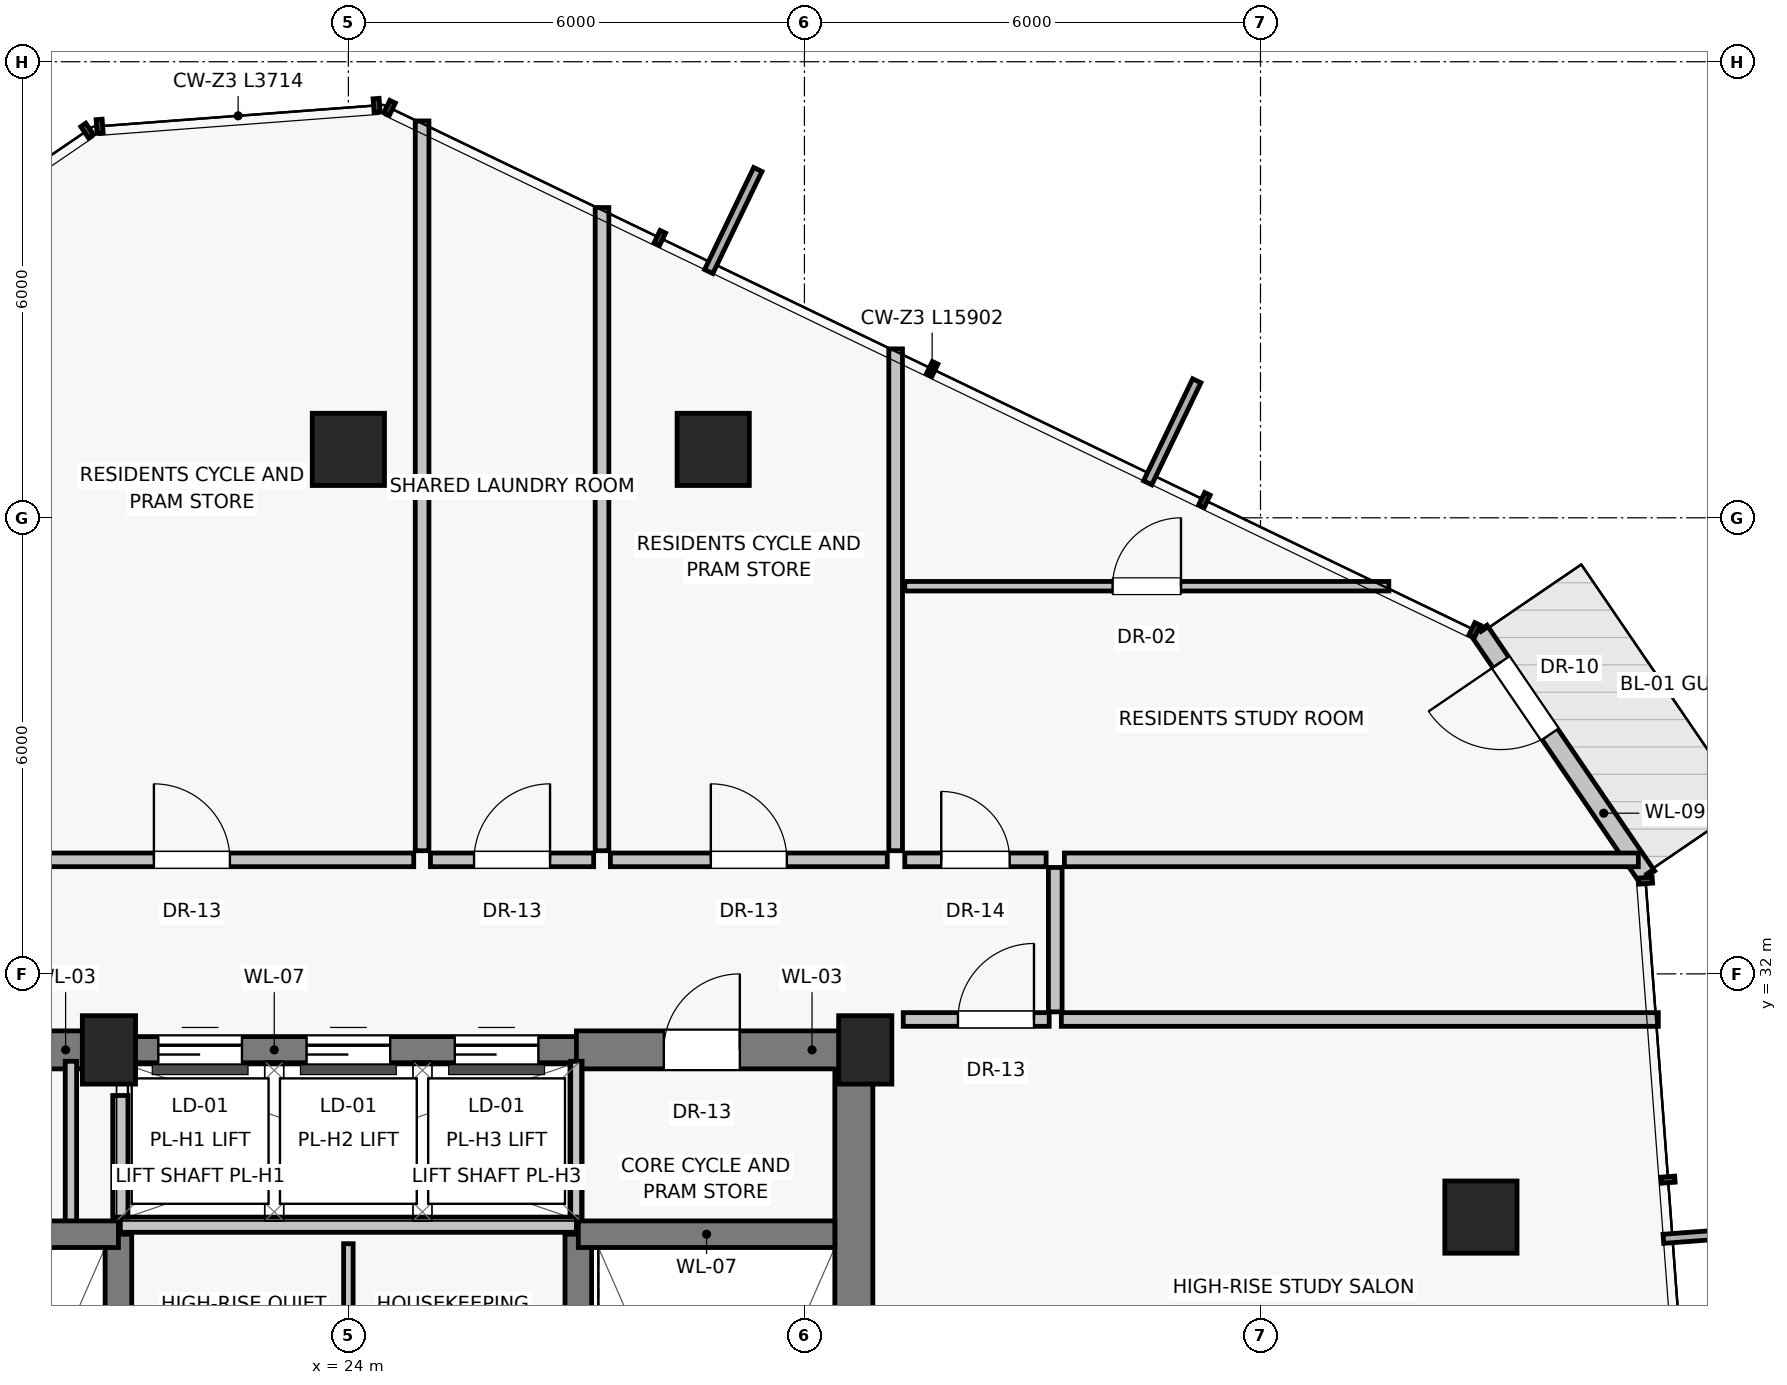
"""IFC4 building model, lengths in metres.
Left out: names, types, materials, properties, quantities, classifications, styles, units other than length and angle.
Written with IfcOpenShell. Run it as: python <this file> out.ifc"""

import sys

from ifc_helpers import new_model, si_unit, direction, frame, frame_2d, origin, origin_2d, place, context, subcontext, project, spatial, rectangle, extrude, source, transform, mapped, element, fill, save


model = new_model("IFC4")
c1 = context("Model", 3, precision=1e-05, world=origin(), true_north=direction((0.0, 1.0)))
c2 = subcontext(c1, "Body", "Model", "MODEL_VIEW")
j1 = project(units=[si_unit("LENGTHUNIT", "METRE"), si_unit("PLANEANGLEUNIT", "RADIAN")], contexts=[c1])
p1 = place(None, origin())
s1 = spatial("IfcSite", under=j1, at=p1, CompositionType="ELEMENT")
p2 = place(p1, origin())
s2 = spatial("IfcBuilding", under=s1, at=p2, CompositionType="ELEMENT")
p3 = place(p2, frame((0.0, 0.0, 191.85)))
s3 = spatial("IfcBuildingStorey", under=s2, at=p3, CompositionType="ELEMENT", Elevation=191.85)
for number, where, z_axis, x_axis in (
    (1, (20.85, 31.0, 0.0), (0.0, 0.0, 1.0), (1.0, 0.0, 0.0)),
    (2, (30.8, 31.0, 0.0), (0.0, 0.0, 1.0), (1.0, 0.0, 0.0)),
):
    element("IfcColumn", number, at=place(p3, frame(where, z_axis=z_axis, x_axis=x_axis)), inside=s3, PredefinedType="PILASTER", context=c2, shape_type="SweptSolid", body=[
        extrude(rectangle(XDim=0.7, YDim=0.9, at=origin_2d()), origin(), (0.0, 0.0, 1.0), 3.25),
    ])
for number, where, z_axis, x_axis in (
    (3, (38.9, 28.8, 0.0), (0.0, 0.0, 1.0), (1.0, 0.0, 0.0)),
    (4, (28.8, 38.9, 0.0), (0.0, 0.0, 1.0), (1.0, 0.0, 0.0)),
    (5, (24.0, 38.9, 0.0), (0.0, 0.0, 1.0), (1.0, 0.0, 0.0)),
):
    element("IfcColumn", number, at=place(p3, frame(where, z_axis=z_axis, x_axis=x_axis)), inside=s3, PredefinedType="COLUMN", context=c2, shape_type="SweptSolid", body=[
        extrude(rectangle(XDim=0.95, YDim=0.95, at=origin_2d()), origin(), (0.0, 0.0, 1.0), 3.25),
    ])
p4 = place(p3, frame((41.082, 33.284, 0.0), z_axis=(0.0, 0.0, 1.0), x_axis=(-0.563549704733, 0.82608215711, 0.0)))
e6 = element("IfcWall", 6, at=p4, inside=s3, PredefinedType="SOLIDWALL", context=c2, shape_type="SweptSolid", body=[
    extrude(rectangle(XDim=3.914, YDim=0.25, at=frame_2d((1.957, 0.0))), origin(), (0.0, 0.0, 1.0), 3.015),
])
p5 = place(p4, frame((2.26, 0.0, 0.0)))
e7 = element("IfcOpeningElement", 7, at=p5, cuts=e6, PredefinedType="OPENING", context=c2, shape_type="SweptSolid", body=[
    extrude(rectangle(XDim=1.15, YDim=2.25, at=frame_2d((0.575, 1.125))), frame((0.0, 0.135, 0.0), z_axis=(0.0, -1.0, 0.0), x_axis=(1.0, 0.0, 0.0)), (0.0, 0.0, 1.0), 0.27),
])
p6 = place(p3, frame((30.65, 16.8, 0.0), z_axis=(0.0, 0.0, 1.0), x_axis=(0.0, 1.0, 0.0)))
e8 = element("IfcWall", 8, at=p6, inside=s3, PredefinedType="SHEAR", context=c2, shape_type="SweptSolid", body=[
    extrude(rectangle(XDim=14.2, YDim=0.5, at=frame_2d((7.1, 0.0))), origin(), (0.0, 0.0, 1.0), 3.015),
])
p7 = place(p3, frame((17.2, 31.0, 0.0), z_axis=(0.0, 0.0, 1.0), x_axis=(1.0, 0.0, 0.0)))
e9 = element("IfcWall", 9, at=p7, inside=s3, PredefinedType="SHEAR", context=c2, shape_type="SweptSolid", body=[
    extrude(rectangle(XDim=3.8, YDim=0.5, at=frame_2d((1.9, 0.0))), origin(), (0.0, 0.0, 1.0), 3.015),
])
p8 = place(p7, frame((1.25, 0.0, 0.0)))
e10 = element("IfcOpeningElement", 10, at=p8, cuts=e9, PredefinedType="OPENING", context=c2, shape_type="SweptSolid", body=[
    extrude(rectangle(XDim=0.86, YDim=2.01, at=frame_2d((0.43, 1.005))), frame((0.0, 0.26, 0.0), z_axis=(0.0, -1.0, 0.0), x_axis=(1.0, 0.0, 0.0)), (0.0, 0.0, 1.0), 0.52),
])
p9 = place(p3, frame((21.0, 31.0, 0.0), z_axis=(0.0, 0.0, 1.0), x_axis=(1.0, 0.0, 0.0)))
e11 = element("IfcWall", 11, at=p9, inside=s3, PredefinedType="SHEAR", context=c2, shape_type="SweptSolid", body=[
    extrude(rectangle(XDim=6.0, YDim=0.35, at=frame_2d((3.0, 0.0))), origin(), (0.0, 0.0, 1.0), 3.015),
])
p10 = place(p9, frame((0.5, 0.0, 0.0)))
e12 = element("IfcOpeningElement", 12, at=p10, cuts=e11, PredefinedType="OPENING", context=c2, shape_type="SweptSolid", body=[
    extrude(rectangle(XDim=1.1, YDim=2.08, at=frame_2d((0.55, 1.04))), frame((0.0, 0.185, 0.0), z_axis=(0.0, -1.0, 0.0), x_axis=(1.0, 0.0, 0.0)), (0.0, 0.0, 1.0), 0.37),
])
p11 = place(p9, frame((2.45, 0.0, 0.0)))
e13 = element("IfcOpeningElement", 13, at=p11, cuts=e11, PredefinedType="OPENING", context=c2, shape_type="SweptSolid", body=[
    extrude(rectangle(XDim=1.1, YDim=2.08, at=frame_2d((0.55, 1.04))), frame((0.0, 0.185, 0.0), z_axis=(0.0, -1.0, 0.0), x_axis=(1.0, 0.0, 0.0)), (0.0, 0.0, 1.0), 0.37),
])
p12 = place(p9, frame((4.4, 0.0, 0.0)))
e14 = element("IfcOpeningElement", 14, at=p12, cuts=e11, PredefinedType="OPENING", context=c2, shape_type="SweptSolid", body=[
    extrude(rectangle(XDim=1.1, YDim=2.08, at=frame_2d((0.55, 1.04))), frame((0.0, 0.185, 0.0), z_axis=(0.0, -1.0, 0.0), x_axis=(1.0, 0.0, 0.0)), (0.0, 0.0, 1.0), 0.37),
])
p13 = place(p3, frame((27.0, 31.0, 0.0), z_axis=(0.0, 0.0, 1.0), x_axis=(1.0, 0.0, 0.0)))
e15 = element("IfcWall", 15, at=p13, inside=s3, PredefinedType="SHEAR", context=c2, shape_type="SweptSolid", body=[
    extrude(rectangle(XDim=3.8, YDim=0.5, at=frame_2d((1.9, 0.0))), origin(), (0.0, 0.0, 1.0), 3.015),
])
p14 = place(p13, frame((1.15, 0.0, 0.0)))
e16 = element("IfcOpeningElement", 16, at=p14, cuts=e15, PredefinedType="OPENING", context=c2, shape_type="SweptSolid", body=[
    extrude(rectangle(XDim=1.0, YDim=2.01, at=frame_2d((0.5, 1.005))), frame((0.0, 0.26, 0.0), z_axis=(0.0, -1.0, 0.0), x_axis=(1.0, 0.0, 0.0)), (0.0, 0.0, 1.0), 0.52),
])
for number, where, z_axis, x_axis in (
    (17, (20.35, 28.65, 0.0), (0.0, 0.0, 1.0), (0.0, 1.0, 0.0)),
    (18, (27.0, 28.65, 0.0), (0.0, 0.0, 1.0), (0.0, 1.0, 0.0)),
):
    element("IfcWall", number, at=place(p3, frame(where, z_axis=z_axis, x_axis=x_axis)), inside=s3, PredefinedType="PARTITIONING", context=c2, shape_type="SweptSolid", body=[
        extrude(rectangle(XDim=2.2, YDim=0.15, at=frame_2d((1.1, 0.0))), origin(), (0.0, 0.0, 1.0), 3.015),
    ])
for number, where, z_axis, x_axis in (
    (19, (20.975, 19.8, 0.0), (0.0, 0.0, 1.0), (0.0, 1.0, 0.0)),
    (20, (27.025, 19.8, 0.0), (0.0, 0.0, 1.0), (0.0, 1.0, 0.0)),
):
    element("IfcWall", number, at=place(p3, frame(where, z_axis=z_axis, x_axis=x_axis)), inside=s3, PredefinedType="SHEAR", context=c2, shape_type="SweptSolid", body=[
        extrude(rectangle(XDim=8.775, YDim=0.35, at=frame_2d((4.387, 0.0))), origin(), (0.0, 0.0, 1.0), 3.015),
    ])
for number, where, z_axis, x_axis in (
    (21, (17.6, 28.575, 0.0), (0.0, 0.0, 1.0), (1.0, 0.0, 0.0)),
    (22, (27.025, 28.575, 0.0), (0.0, 0.0, 1.0), (1.0, 0.0, 0.0)),
):
    element("IfcWall", number, at=place(p3, frame(where, z_axis=z_axis, x_axis=x_axis)), inside=s3, PredefinedType="SHEAR", context=c2, shape_type="SweptSolid", body=[
        extrude(rectangle(XDim=3.375, YDim=0.35, at=frame_2d((1.688, 0.0))), origin(), (0.0, 0.0, 1.0), 3.015),
    ])
p15 = place(p3, frame((21.0, 28.7, 0.0), z_axis=(0.0, 0.0, 1.0), x_axis=(1.0, 0.0, 0.0)))
e23 = element("IfcWall", 23, at=p15, inside=s3, PredefinedType="SOLIDWALL", context=c2, shape_type="SweptSolid", body=[
    extrude(rectangle(XDim=6.0, YDim=0.2, at=frame_2d((3.0, 0.0))), origin(), (0.0, 0.0, 1.0), 3.015),
])
p16 = place(p3, frame((21.0, 28.8, 0.0), z_axis=(0.0, 0.0, 1.0), x_axis=(0.0, 1.0, 0.0)))
e24 = element("IfcWall", 24, at=p16, inside=s3, PredefinedType="SOLIDWALL", context=c2, shape_type="SweptSolid", body=[
    extrude(rectangle(XDim=1.6, YDim=0.2, at=frame_2d((0.8, 0.0))), origin(), (0.0, 0.0, 1.0), 3.015),
])
p17 = place(p3, frame((24.0, 25.42, 0.0), z_axis=(0.0, 0.0, 1.0), x_axis=(0.0, 1.0, 0.0)))
e25 = element("IfcWall", 25, at=p17, inside=s3, PredefinedType="PARTITIONING", context=c2, shape_type="SweptSolid", body=[
    extrude(rectangle(XDim=3.03, YDim=0.125, at=frame_2d((1.515, 0.0))), origin(), (0.0, 0.0, 1.0), 3.015),
])
p18 = place(p3, frame((31.2, 33.62, 0.0), z_axis=(0.0, 0.0, 1.0), x_axis=(0.0, 1.0, 0.0)))
e26 = element("IfcWall", 26, at=p18, inside=s3, PredefinedType="PARTITIONING", context=c2, shape_type="SweptSolid", body=[
    extrude(rectangle(XDim=6.603, YDim=0.18, at=frame_2d((3.301, 0.0))), origin(), (0.0, 0.0, 1.0), 3.015),
])
p19 = place(p3, frame((19.023, 33.5, 0.0), z_axis=(0.0, 0.0, 1.0), x_axis=(1.0, 0.0, 0.0)))
e27 = element("IfcWall", 27, at=p19, inside=s3, PredefinedType="PARTITIONING", context=c2, shape_type="SweptSolid", body=[
    extrude(rectangle(XDim=5.837, YDim=0.18, at=frame_2d((2.918, 0.0))), origin(), (0.0, 0.0, 1.0), 3.015),
])
p20 = place(p19, frame((2.418, 0.0, 0.0)))
e28 = element("IfcOpeningElement", 28, at=p20, cuts=e27, PredefinedType="OPENING", context=c2, shape_type="SweptSolid", body=[
    extrude(rectangle(XDim=1.0, YDim=2.01, at=frame_2d((0.5, 1.005))), frame((0.0, 0.1, 0.0), z_axis=(0.0, -1.0, 0.0), x_axis=(1.0, 0.0, 0.0)), (0.0, 0.0, 1.0), 0.2),
])
p21 = place(p3, frame((24.97, 33.62, 0.0), z_axis=(0.0, 0.0, 1.0), x_axis=(0.0, 1.0, 0.0)))
e29 = element("IfcWall", 29, at=p21, inside=s3, PredefinedType="PARTITIONING", context=c2, shape_type="SweptSolid", body=[
    extrude(rectangle(XDim=9.601, YDim=0.18, at=frame_2d((4.8, 0.0))), origin(), (0.0, 0.0, 1.0), 3.015),
])
p22 = place(p3, frame((25.08, 33.5, 0.0), z_axis=(0.0, 0.0, 1.0), x_axis=(1.0, 0.0, 0.0)))
e30 = element("IfcWall", 30, at=p22, inside=s3, PredefinedType="PARTITIONING", context=c2, shape_type="SweptSolid", body=[
    extrude(rectangle(XDim=2.147, YDim=0.18, at=frame_2d((1.073, 0.0))), origin(), (0.0, 0.0, 1.0), 3.015),
])
p23 = place(p22, frame((0.573, 0.0, 0.0)))
e31 = element("IfcOpeningElement", 31, at=p23, cuts=e30, PredefinedType="OPENING", context=c2, shape_type="SweptSolid", body=[
    extrude(rectangle(XDim=1.0, YDim=2.01, at=frame_2d((0.5, 1.005))), frame((0.0, 0.1, 0.0), z_axis=(0.0, -1.0, 0.0), x_axis=(1.0, 0.0, 0.0)), (0.0, 0.0, 1.0), 0.2),
])
p24 = place(p3, frame((27.447, 33.5, 0.0), z_axis=(0.0, 0.0, 1.0), x_axis=(1.0, 0.0, 0.0)))
e32 = element("IfcWall", 32, at=p24, inside=s3, PredefinedType="PARTITIONING", context=c2, shape_type="SweptSolid", body=[
    extrude(rectangle(XDim=3.643, YDim=0.18, at=frame_2d((1.822, 0.0))), origin(), (0.0, 0.0, 1.0), 3.015),
])
p25 = place(p24, frame((1.322, 0.0, 0.0)))
e33 = element("IfcOpeningElement", 33, at=p25, cuts=e32, PredefinedType="OPENING", context=c2, shape_type="SweptSolid", body=[
    extrude(rectangle(XDim=1.0, YDim=2.01, at=frame_2d((0.5, 1.005))), frame((0.0, 0.1, 0.0), z_axis=(0.0, -1.0, 0.0), x_axis=(1.0, 0.0, 0.0)), (0.0, 0.0, 1.0), 0.2),
])
p26 = place(p3, frame((27.337, 33.62, 0.0), z_axis=(0.0, 0.0, 1.0), x_axis=(0.0, 1.0, 0.0)))
e34 = element("IfcWall", 34, at=p26, inside=s3, PredefinedType="PARTITIONING", context=c2, shape_type="SweptSolid", body=[
    extrude(rectangle(XDim=8.462, YDim=0.18, at=frame_2d((4.231, 0.0))), origin(), (0.0, 0.0, 1.0), 3.015),
])
p27 = place(p3, frame((33.3, 31.5, 0.0), z_axis=(0.0, 0.0, 1.0), x_axis=(0.0, 1.0, 0.0)))
e35 = element("IfcWall", 35, at=p27, inside=s3, PredefinedType="PARTITIONING", context=c2, shape_type="SweptSolid", body=[
    extrude(rectangle(XDim=1.9, YDim=0.18, at=frame_2d((0.95, 0.0))), origin(), (0.0, 0.0, 1.0), 3.015),
])
p28 = place(p3, frame((31.3, 31.4, 0.0), z_axis=(0.0, 0.0, 1.0), x_axis=(1.0, 0.0, 0.0)))
e36 = element("IfcWall", 36, at=p28, inside=s3, PredefinedType="PARTITIONING", context=c2, shape_type="SweptSolid", body=[
    extrude(rectangle(XDim=1.92, YDim=0.18, at=frame_2d((0.96, 0.0))), origin(), (0.0, 0.0, 1.0), 3.015),
])
p29 = place(p28, frame((0.72, 0.0, 0.0)))
e37 = element("IfcOpeningElement", 37, at=p29, cuts=e36, PredefinedType="OPENING", context=c2, shape_type="SweptSolid", body=[
    extrude(rectangle(XDim=1.0, YDim=2.01, at=frame_2d((0.5, 1.005))), frame((0.0, 0.1, 0.0), z_axis=(0.0, -1.0, 0.0), x_axis=(1.0, 0.0, 0.0)), (0.0, 0.0, 1.0), 0.2),
])
p30 = place(p3, frame((33.38, 31.4, 0.0), z_axis=(0.0, 0.0, 1.0), x_axis=(1.0, 0.0, 0.0)))
e38 = element("IfcWall", 38, at=p30, inside=s3, PredefinedType="PARTITIONING", context=c2, shape_type="SweptSolid", body=[
    extrude(rectangle(XDim=7.854, YDim=0.18, at=frame_2d((3.927, 0.0))), origin(), (0.0, 0.0, 1.0), 3.015),
])
p31 = place(p3, frame((33.42, 33.5, 0.0), z_axis=(0.0, 0.0, 1.0), x_axis=(1.0, 0.0, 0.0)))
e39 = element("IfcWall", 39, at=p31, inside=s3, PredefinedType="PARTITIONING", context=c2, shape_type="SweptSolid", body=[
    extrude(rectangle(XDim=7.551, YDim=0.18, at=frame_2d((3.775, 0.0))), origin(), (0.0, 0.0, 1.0), 3.015),
])
p32 = place(p3, frame((31.32, 33.5, 0.0), z_axis=(0.0, 0.0, 1.0), x_axis=(1.0, 0.0, 0.0)))
e40 = element("IfcWall", 40, at=p32, inside=s3, PredefinedType="PARTITIONING", context=c2, shape_type="SweptSolid", body=[
    extrude(rectangle(XDim=1.86, YDim=0.18, at=frame_2d((0.93, 0.0))), origin(), (0.0, 0.0, 1.0), 3.015),
])
p33 = place(p32, frame((0.48, 0.0, 0.0)))
e41 = element("IfcOpeningElement", 41, at=p33, cuts=e40, PredefinedType="OPENING", context=c2, shape_type="SweptSolid", body=[
    extrude(rectangle(XDim=0.9, YDim=2.01, at=frame_2d((0.45, 1.005))), frame((0.0, 0.1, 0.0), z_axis=(0.0, -1.0, 0.0), x_axis=(1.0, 0.0, 0.0)), (0.0, 0.0, 1.0), 0.2),
])
p34 = place(p3, frame((31.32, 37.1, 0.0), z_axis=(0.0, 0.0, 1.0), x_axis=(1.0, 0.0, 0.0)))
e42 = element("IfcWall", 42, at=p34, inside=s3, PredefinedType="PARTITIONING", context=c2, shape_type="SweptSolid", body=[
    extrude(rectangle(XDim=6.368, YDim=0.125, at=frame_2d((3.184, 0.0))), origin(), (0.0, 0.0, 1.0), 3.015),
])
p35 = place(p34, frame((2.734, 0.0, 0.0)))
e43 = element("IfcOpeningElement", 43, at=p35, cuts=e42, PredefinedType="OPENING", context=c2, shape_type="SweptSolid", body=[
    extrude(rectangle(XDim=0.9, YDim=2.01, at=frame_2d((0.45, 1.005))), frame((0.0, 0.073, 0.0), z_axis=(0.0, -1.0, 0.0), x_axis=(1.0, 0.0, 0.0)), (0.0, 0.0, 1.0), 0.145),
])
m1 = source(origin(), c2, "Body", "SweptSolid", [
    extrude(rectangle(XDim=1.15, YDim=2.25, at=frame_2d((0.575, 1.125))), frame((0.0, 0.025, 0.0), z_axis=(0.0, -1.0, 0.0), x_axis=(1.0, 0.0, 0.0)), (0.0, 0.0, 1.0), 0.05),
])
p36 = place(p5, frame((1.15, 0.0, 0.0), z_axis=(0.0, 0.0, 1.0), x_axis=(-1.0, 0.0, 0.0)))
e44 = element("IfcDoor", 44, at=p36, inside=s3, OperationType="SINGLE_SWING_RIGHT", PredefinedType="DOOR", context=c2, shape_type="MappedRepresentation", body=[
    mapped(m1, transform((0.0, 0.0, 0.0), scale=1.0)),
])
fill(e7, e44)
m2 = source(origin(), c2, "Body", "SweptSolid", [
    extrude(rectangle(XDim=1.1, YDim=2.08, at=frame_2d((0.55, 1.04))), frame((0.0, 0.025, 0.0), z_axis=(0.0, -1.0, 0.0), x_axis=(1.0, 0.0, 0.0)), (0.0, 0.0, 1.0), 0.05),
])
p37 = place(p10, origin())
e45 = element("IfcDoor", 45, at=p37, inside=s3, OperationType="SLIDING_TO_LEFT", PredefinedType="DOOR", context=c2, shape_type="MappedRepresentation", body=[
    mapped(m2, transform((0.0, 0.0, 0.0), scale=1.0)),
])
fill(e12, e45)
p38 = place(p11, origin())
e46 = element("IfcDoor", 46, at=p38, inside=s3, OperationType="SLIDING_TO_LEFT", PredefinedType="DOOR", context=c2, shape_type="MappedRepresentation", body=[
    mapped(m2, transform((0.0, 0.0, 0.0), scale=1.0)),
])
fill(e13, e46)
p39 = place(p12, origin())
e47 = element("IfcDoor", 47, at=p39, inside=s3, OperationType="SLIDING_TO_LEFT", PredefinedType="DOOR", context=c2, shape_type="MappedRepresentation", body=[
    mapped(m2, transform((0.0, 0.0, 0.0), scale=1.0)),
])
fill(e14, e47)
m3 = source(origin(), c2, "Body", "SweptSolid", [
    extrude(rectangle(XDim=1.0, YDim=2.01, at=frame_2d((0.5, 1.005))), frame((0.0, 0.025, 0.0), z_axis=(0.0, -1.0, 0.0), x_axis=(1.0, 0.0, 0.0)), (0.0, 0.0, 1.0), 0.05),
])
p40 = place(p14, origin())
e48 = element("IfcDoor", 48, at=p40, inside=s3, OperationType="SINGLE_SWING_RIGHT", PredefinedType="DOOR", context=c2, shape_type="MappedRepresentation", body=[
    mapped(m3, transform((0.0, 0.0, 0.0), scale=1.0)),
])
fill(e16, e48)
p41 = place(p20, origin())
e49 = element("IfcDoor", 49, at=p41, inside=s3, OperationType="SINGLE_SWING_LEFT", PredefinedType="DOOR", context=c2, shape_type="MappedRepresentation", body=[
    mapped(m3, transform((0.0, 0.0, 0.0), scale=1.0)),
])
fill(e28, e49)
p42 = place(p23, origin())
e50 = element("IfcDoor", 50, at=p42, inside=s3, OperationType="SINGLE_SWING_RIGHT", PredefinedType="DOOR", context=c2, shape_type="MappedRepresentation", body=[
    mapped(m3, transform((0.0, 0.0, 0.0), scale=1.0)),
])
fill(e31, e50)
p43 = place(p25, origin())
e51 = element("IfcDoor", 51, at=p43, inside=s3, OperationType="SINGLE_SWING_LEFT", PredefinedType="DOOR", context=c2, shape_type="MappedRepresentation", body=[
    mapped(m3, transform((0.0, 0.0, 0.0), scale=1.0)),
])
fill(e33, e51)
p44 = place(p29, origin())
e52 = element("IfcDoor", 52, at=p44, inside=s3, OperationType="SINGLE_SWING_RIGHT", PredefinedType="DOOR", context=c2, shape_type="MappedRepresentation", body=[
    mapped(m3, transform((0.0, 0.0, 0.0), scale=1.0)),
])
fill(e37, e52)
m4 = source(origin(), c2, "Body", "SweptSolid", [
    extrude(rectangle(XDim=0.9, YDim=2.01, at=frame_2d((0.45, 1.005))), frame((0.0, 0.025, 0.0), z_axis=(0.0, -1.0, 0.0), x_axis=(1.0, 0.0, 0.0)), (0.0, 0.0, 1.0), 0.05),
])
p45 = place(p33, origin())
e53 = element("IfcDoor", 53, at=p45, inside=s3, OperationType="SINGLE_SWING_LEFT", PredefinedType="DOOR", context=c2, shape_type="MappedRepresentation", body=[
    mapped(m4, transform((0.0, 0.0, 0.0), scale=1.0)),
])
fill(e41, e53)
p46 = place(p35, origin())
e54 = element("IfcDoor", 54, at=p46, inside=s3, OperationType="SINGLE_SWING_RIGHT", PredefinedType="DOOR", context=c2, shape_type="MappedRepresentation", body=[
    mapped(m4, transform((0.0, 0.0, 0.0), scale=1.0)),
])
fill(e43, e54)
save(model, sys.argv[1])
